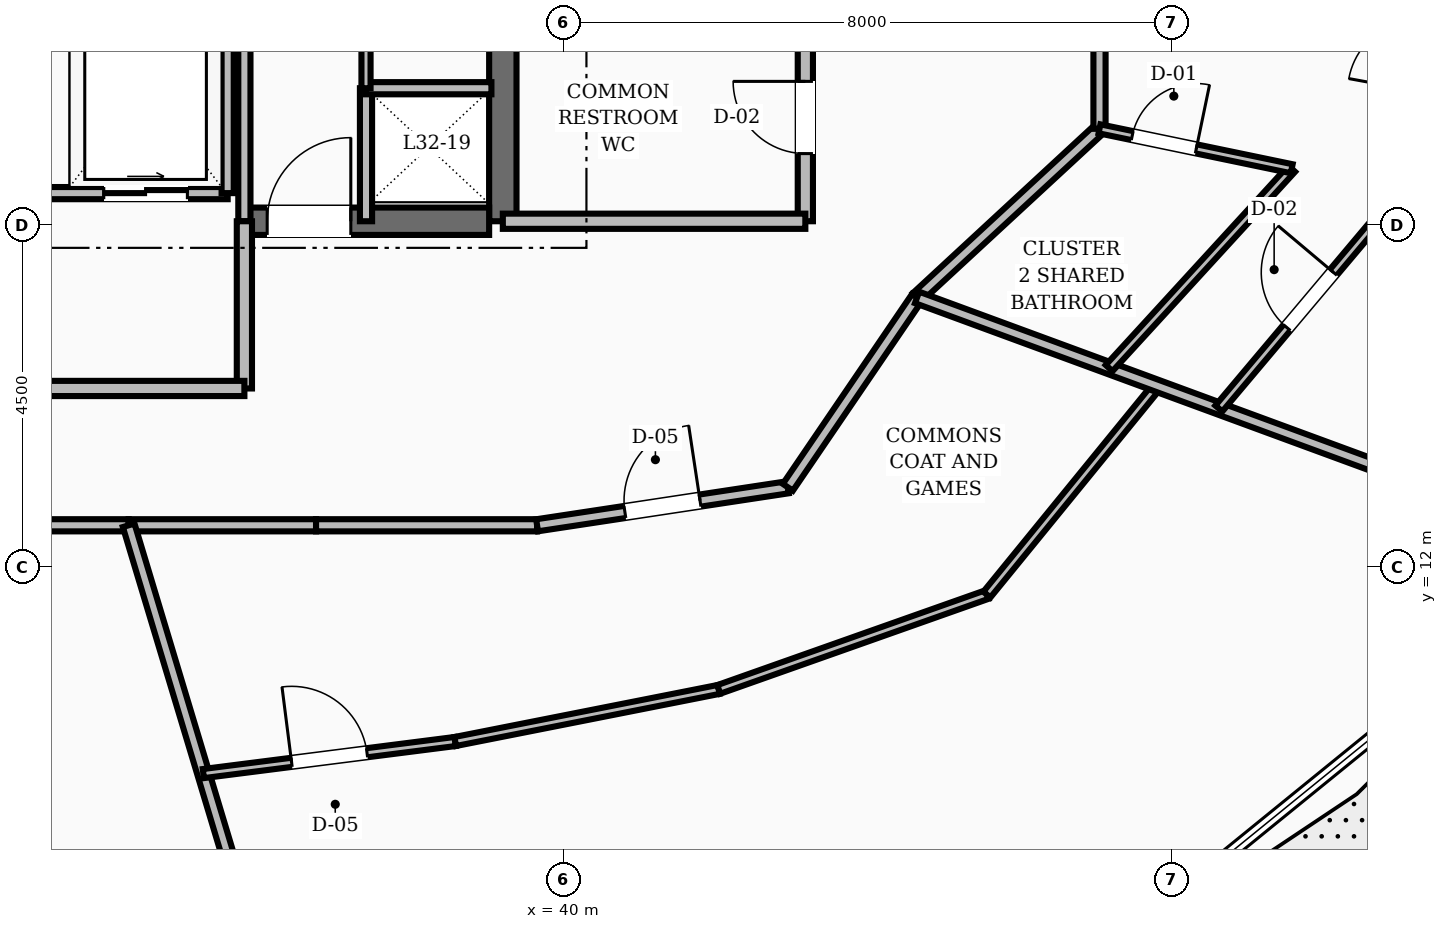
"""IFC4 building model, lengths in metres.
Left out: names, types, materials, properties, quantities, classifications, styles, units other than length and angle.
Written with IfcOpenShell. Run it as: python <this file> out.ifc"""

import sys

from ifc_helpers import new_model, si_unit, direction, frame, frame_2d, origin, place, context, subcontext, project, spatial, rectangle, extrude, element, fill, save


model = new_model("IFC4")
c1 = context("Model", 3, precision=1e-05, world=origin(), true_north=direction((0.0, 1.0)))
c2 = subcontext(c1, "Body", "Model", "MODEL_VIEW")
j1 = project(units=[si_unit("LENGTHUNIT", "METRE"), si_unit("PLANEANGLEUNIT", "RADIAN")], contexts=[c1])
p1 = place(None, origin())
s1 = spatial("IfcSite", under=j1, at=p1, CompositionType="ELEMENT")
p2 = place(p1, origin())
s2 = spatial("IfcBuilding", under=s1, at=p2, CompositionType="ELEMENT")
p3 = place(p2, frame((0.0, 0.0, 128.0)))
s3 = spatial("IfcBuildingStorey", under=s2, at=p3, CompositionType="ELEMENT", Elevation=128.0)
p4 = place(p3, frame((39.2, 16.55, 0.0), z_axis=(0.0, 0.0, 1.0), x_axis=(0.0, 1.0, 0.0)))
e1 = element("IfcWall", 1, at=p4, inside=s3, PredefinedType="SHEAR", context=c2, shape_type="SweptSolid", body=[
    extrude(rectangle(XDim=6.3, YDim=0.36, at=frame_2d((3.15, 0.0))), origin(), (0.0, 0.0, 1.0), 3.6),
])
p5 = place(p3, frame((35.8, 16.55, 0.0), z_axis=(0.0, 0.0, 1.0), x_axis=(1.0, 0.0, 0.0)))
e2 = element("IfcWall", 2, at=p5, inside=s3, PredefinedType="SHEAR", context=c2, shape_type="SweptSolid", body=[
    extrude(rectangle(XDim=3.22, YDim=0.36, at=frame_2d((1.61, 0.0))), origin(), (0.0, 0.0, 1.0), 3.6),
])
p6 = place(p5, frame((0.3, 0.0, 0.0)))
e3 = element("IfcOpeningElement", 3, at=p6, cuts=e2, PredefinedType="OPENING", context=c2, shape_type="SweptSolid", body=[
    extrude(rectangle(XDim=1.1, YDim=2.1, at=frame_2d((0.55, 1.05))), frame((0.0, 0.19, 0.0), z_axis=(0.0, -1.0, 0.0), x_axis=(1.0, 0.0, 0.0)), (0.0, 0.0, 1.0), 0.38),
])
p7 = place(p3, frame((43.18, 16.55, 0.0), z_axis=(0.0, 0.0, 1.0), x_axis=(0.0, 1.0, 0.0)))
e4 = element("IfcWall", 4, at=p7, inside=s3, PredefinedType="SOLIDWALL", context=c2, shape_type="SweptSolid", body=[
    extrude(rectangle(XDim=2.73, YDim=0.2, at=frame_2d((1.365, 0.0))), origin(), (0.0, 0.0, 1.0), 2.8),
])
p8 = place(p7, frame((0.89, 0.0, 0.0)))
e5 = element("IfcOpeningElement", 5, at=p8, cuts=e4, PredefinedType="OPENING", context=c2, shape_type="SweptSolid", body=[
    extrude(rectangle(XDim=0.95, YDim=2.1, at=frame_2d((0.475, 1.05))), frame((0.0, 0.11, 0.0), z_axis=(0.0, -1.0, 0.0), x_axis=(1.0, 0.0, 0.0)), (0.0, 0.0, 1.0), 0.22),
])
p9 = place(p3, frame((39.2, 16.55, 0.0), z_axis=(0.0, 0.0, 1.0), x_axis=(1.0, 0.0, 0.0)))
e6 = element("IfcWall", 6, at=p9, inside=s3, PredefinedType="SOLIDWALL", context=c2, shape_type="SweptSolid", body=[
    extrude(rectangle(XDim=3.98, YDim=0.2, at=frame_2d((1.99, 0.0))), origin(), (0.0, 0.0, 1.0), 2.8),
])
p10 = place(p3, frame((35.8, 16.55, 0.0), z_axis=(0.0, 0.0, 1.0), x_axis=(0.0, 1.0, 0.0)))
e7 = element("IfcWall", 7, at=p10, inside=s3, PredefinedType="SOLIDWALL", context=c2, shape_type="SweptSolid", body=[
    extrude(rectangle(XDim=3.3, YDim=0.16, at=frame_2d((1.65, 0.0))), origin(), (0.0, 0.0, 1.0), 2.8),
])
p11 = place(p3, frame((37.4, 16.55, 0.0), z_axis=(0.0, 0.0, 1.0), x_axis=(0.0, 1.0, 0.0)))
e8 = element("IfcWall", 8, at=p11, inside=s3, PredefinedType="SOLIDWALL", context=c2, shape_type="SweptSolid", body=[
    extrude(rectangle(XDim=1.75, YDim=0.16, at=frame_2d((0.875, 0.0))), origin(), (0.0, 0.0, 1.0), 2.8),
])
p12 = place(p3, frame((35.8, 14.35, 0.0), z_axis=(0.0, 0.0, 1.0), x_axis=(0.0, 1.0, 0.0)))
e9 = element("IfcWall", 9, at=p12, inside=s3, PredefinedType="SOLIDWALL", context=c2, shape_type="SweptSolid", body=[
    extrude(rectangle(XDim=2.2, YDim=0.2, at=frame_2d((1.1, 0.0))), origin(), (0.0, 0.0, 1.0), 2.8),
])
p13 = place(p3, frame((28.2, 14.35, 0.0), z_axis=(0.0, 0.0, 1.0), x_axis=(1.0, 0.0, 0.0)))
e10 = element("IfcWall", 10, at=p13, inside=s3, PredefinedType="SOLIDWALL", context=c2, shape_type="SweptSolid", body=[
    extrude(rectangle(XDim=7.6, YDim=0.2, at=frame_2d((3.8, 0.0))), origin(), (0.0, 0.0, 1.0), 2.8),
])
p14 = place(p13, frame((3.2, 0.0, 0.0)))
e11 = element("IfcOpeningElement", 11, at=p14, cuts=e10, PredefinedType="OPENING", context=c2, shape_type="SweptSolid", body=[
    extrude(rectangle(XDim=1.2, YDim=2.1, at=frame_2d((0.6, 1.05))), frame((0.0, 0.11, 0.0), z_axis=(0.0, -1.0, 0.0), x_axis=(1.0, 0.0, 0.0)), (0.0, 0.0, 1.0), 0.22),
])
p15 = place(p3, frame((28.42, 16.92, 0.0), z_axis=(0.0, 0.0, 1.0), x_axis=(1.0, 0.0, 0.0)))
e12 = element("IfcWall", 12, at=p15, inside=s3, PredefinedType="SOLIDWALL", context=c2, shape_type="SweptSolid", body=[
    extrude(rectangle(XDim=7.16, YDim=0.16, at=frame_2d((3.58, 0.0))), origin(), (0.0, 0.0, 1.0), 2.8),
])
p16 = place(p15, frame((0.53, 0.0, 0.0)))
e13 = element("IfcOpeningElement", 13, at=p16, cuts=e12, PredefinedType="OPENING", context=c2, shape_type="SweptSolid", body=[
    extrude(rectangle(XDim=1.1, YDim=2.15, at=frame_2d((0.55, 1.075))), frame((0.0, 0.09, 0.0), z_axis=(0.0, -1.0, 0.0), x_axis=(1.0, 0.0, 0.0)), (0.0, 0.0, 1.0), 0.18),
])
p17 = place(p15, frame((3.03, 0.0, 0.0)))
e14 = element("IfcOpeningElement", 14, at=p17, cuts=e12, PredefinedType="OPENING", context=c2, shape_type="SweptSolid", body=[
    extrude(rectangle(XDim=1.1, YDim=2.15, at=frame_2d((0.55, 1.075))), frame((0.0, 0.09, 0.0), z_axis=(0.0, -1.0, 0.0), x_axis=(1.0, 0.0, 0.0)), (0.0, 0.0, 1.0), 0.18),
])
p18 = place(p15, frame((5.53, 0.0, 0.0)))
e15 = element("IfcOpeningElement", 15, at=p18, cuts=e12, PredefinedType="OPENING", context=c2, shape_type="SweptSolid", body=[
    extrude(rectangle(XDim=1.1, YDim=2.15, at=frame_2d((0.55, 1.075))), frame((0.0, 0.09, 0.0), z_axis=(0.0, -1.0, 0.0), x_axis=(1.0, 0.0, 0.0)), (0.0, 0.0, 1.0), 0.18),
])
p19 = place(p3, frame((35.58, 16.92, 0.0), z_axis=(0.0, 0.0, 1.0), x_axis=(0.0, 1.0, 0.0)))
e16 = element("IfcWall", 16, at=p19, inside=s3, PredefinedType="SOLIDWALL", context=c2, shape_type="SweptSolid", body=[
    extrude(rectangle(XDim=2.76, YDim=0.16, at=frame_2d((1.38, 0.0))), origin(), (0.0, 0.0, 1.0), 2.8),
])
p20 = place(p3, frame((37.4, 18.3, 0.0), z_axis=(0.0, 0.0, 1.0), x_axis=(1.0, 0.0, 0.0)))
e17 = element("IfcWall", 17, at=p20, inside=s3, PredefinedType="SOLIDWALL", context=c2, shape_type="SweptSolid", body=[
    extrude(rectangle(XDim=1.65, YDim=0.16, at=frame_2d((0.825, 0.0))), origin(), (0.0, 0.0, 1.0), 2.8),
])
p21 = place(p3, frame((37.4, 18.3, 0.0), z_axis=(0.0, 0.0, 1.0), x_axis=(0.0, 1.0, 0.0)))
e18 = element("IfcWall", 18, at=p21, inside=s3, PredefinedType="PARTITIONING", context=c2, shape_type="SweptSolid", body=[
    extrude(rectangle(XDim=4.45, YDim=0.12, at=frame_2d((2.225, 0.0))), origin(), (0.0, 0.0, 1.0), 2.8),
])
p22 = place(p21, frame((1.75, 0.0, 0.0)))
e19 = element("IfcOpeningElement", 19, at=p22, cuts=e18, PredefinedType="OPENING", context=c2, shape_type="SweptSolid", body=[
    extrude(rectangle(XDim=0.95, YDim=2.1, at=frame_2d((0.475, 1.05))), frame((0.0, 0.07, 0.0), z_axis=(0.0, -1.0, 0.0), x_axis=(1.0, 0.0, 0.0)), (0.0, 0.0, 1.0), 0.14),
])
p23 = place(p3, frame((32.0, 12.55, 0.0), z_axis=(0.0, 0.0, 1.0), x_axis=(1.0, 0.0, 0.0)))
e20 = element("IfcWall", 20, at=p23, inside=s3, PredefinedType="SOLIDWALL", context=c2, shape_type="SweptSolid", body=[
    extrude(rectangle(XDim=2.278, YDim=0.16, at=frame_2d((1.139, 0.0))), origin(), (0.0, 0.0, 1.0), 2.8),
])
p24 = place(p3, frame((34.278, 12.55, 0.0), z_axis=(0.0, 0.0, 1.0), x_axis=(1.0, 0.0, 0.0)))
e21 = element("IfcWall", 21, at=p24, inside=s3, PredefinedType="SOLIDWALL", context=c2, shape_type="SweptSolid", body=[
    extrude(rectangle(XDim=2.465, YDim=0.16, at=frame_2d((1.232, 0.0))), origin(), (0.0, 0.0, 1.0), 2.8),
])
p25 = place(p3, frame((36.743, 12.55, 0.0), z_axis=(0.0, 0.0, 1.0), x_axis=(1.0, 0.0, 0.0)))
e22 = element("IfcWall", 22, at=p25, inside=s3, PredefinedType="SOLIDWALL", context=c2, shape_type="SweptSolid", body=[
    extrude(rectangle(XDim=2.908, YDim=0.16, at=frame_2d((1.454, 0.0))), origin(), (0.0, 0.0, 1.0), 2.8),
])
p26 = place(p3, frame((39.651, 12.55, 0.0), z_axis=(0.0, 0.0, 1.0), x_axis=(0.988710906508, 0.149835721217, 0.0)))
e23 = element("IfcWall", 23, at=p26, inside=s3, PredefinedType="SOLIDWALL", context=c2, shape_type="SweptSolid", body=[
    extrude(rectangle(XDim=3.337, YDim=0.16, at=frame_2d((1.668, 0.0))), origin(), (0.0, 0.0, 1.0), 2.8),
])
p27 = place(p26, frame((1.168, 0.0, 0.0)))
e24 = element("IfcOpeningElement", 24, at=p27, cuts=e23, PredefinedType="OPENING", context=c2, shape_type="SweptSolid", body=[
    extrude(rectangle(XDim=1.0, YDim=2.1, at=frame_2d((0.5, 1.05))), frame((0.0, 0.09, 0.0), z_axis=(0.0, -1.0, 0.0), x_axis=(1.0, 0.0, 0.0)), (0.0, 0.0, 1.0), 0.18),
])
p28 = place(p3, frame((42.95, 13.05, 0.0), z_axis=(0.0, 0.0, 1.0), x_axis=(0.562674669208, 0.826678423955, 0.0)))
e25 = element("IfcWall", 25, at=p28, inside=s3, PredefinedType="SOLIDWALL", context=c2, shape_type="SweptSolid", body=[
    extrude(rectangle(XDim=3.021, YDim=0.16, at=frame_2d((1.511, 0.0))), origin(), (0.0, 0.0, 1.0), 2.8),
])
p29 = place(p3, frame((44.65, 15.548, 0.0), z_axis=(0.0, 0.0, 1.0), x_axis=(0.734347936521, 0.678773237633, 0.0)))
e26 = element("IfcWall", 26, at=p29, inside=s3, PredefinedType="SOLIDWALL", context=c2, shape_type="SweptSolid", body=[
    extrude(rectangle(XDim=3.268, YDim=0.16, at=frame_2d((1.634, 0.0))), origin(), (0.0, 0.0, 1.0), 2.8),
])
p30 = place(p3, frame((47.05, 17.766, 0.0), z_axis=(0.0, 0.0, 1.0), x_axis=(0.0, 1.0, 0.0)))
e27 = element("IfcWall", 27, at=p30, inside=s3, PredefinedType="SOLIDWALL", context=c2, shape_type="SweptSolid", body=[
    extrude(rectangle(XDim=3.24, YDim=0.16, at=frame_2d((1.62, 0.0))), origin(), (0.0, 0.0, 1.0), 2.8),
])
p31 = place(p30, frame((1.12, 0.0, 0.0)))
e28 = element("IfcOpeningElement", 28, at=p31, cuts=e27, PredefinedType="OPENING", context=c2, shape_type="SweptSolid", body=[
    extrude(rectangle(XDim=1.0, YDim=2.1, at=frame_2d((0.5, 1.05))), frame((0.0, 0.09, 0.0), z_axis=(0.0, -1.0, 0.0), x_axis=(1.0, 0.0, 0.0)), (0.0, 0.0, 1.0), 0.18),
])
p32 = place(p3, frame((34.278, 12.55, 0.0), z_axis=(0.0, 0.0, 1.0), x_axis=(0.288080089765, -0.957606318839, 0.0)))
e29 = element("IfcWall", 29, at=p32, inside=s3, PredefinedType="SOLIDWALL", context=c2, shape_type="SweptSolid", body=[
    extrude(rectangle(XDim=9.696, YDim=0.16, at=frame_2d((4.848, 0.0))), origin(), (0.0, 0.0, 1.0), 2.8),
])
p33 = place(p3, frame((35.26, 9.284, 0.0), z_axis=(0.0, 0.0, 1.0), x_axis=(0.99199308458, 0.126292201441, 0.0)))
e30 = element("IfcWall", 30, at=p33, inside=s3, PredefinedType="PARTITIONING", context=c2, shape_type="SweptSolid", body=[
    extrude(rectangle(XDim=3.341, YDim=0.12, at=frame_2d((1.67, 0.0))), origin(), (0.0, 0.0, 1.0), 2.8),
])
p34 = place(p33, frame((1.17, 0.0, 0.0)))
e31 = element("IfcOpeningElement", 31, at=p34, cuts=e30, PredefinedType="OPENING", context=c2, shape_type="SweptSolid", body=[
    extrude(rectangle(XDim=1.0, YDim=2.1, at=frame_2d((0.5, 1.05))), frame((0.0, 0.07, 0.0), z_axis=(0.0, -1.0, 0.0), x_axis=(1.0, 0.0, 0.0)), (0.0, 0.0, 1.0), 0.14),
])
p35 = place(p3, frame((38.574, 9.706, 0.0), z_axis=(0.0, 0.0, 1.0), x_axis=(0.981021848775, 0.19389722078, 0.0)))
e32 = element("IfcWall", 32, at=p35, inside=s3, PredefinedType="PARTITIONING", context=c2, shape_type="SweptSolid", body=[
    extrude(rectangle(XDim=3.534, YDim=0.12, at=frame_2d((1.767, 0.0))), origin(), (0.0, 0.0, 1.0), 2.8),
])
p36 = place(p3, frame((42.041, 10.391, 0.0), z_axis=(0.0, 0.0, 1.0), x_axis=(0.942784138044, 0.333403762806, 0.0)))
e33 = element("IfcWall", 33, at=p36, inside=s3, PredefinedType="PARTITIONING", context=c2, shape_type="SweptSolid", body=[
    extrude(rectangle(XDim=3.741, YDim=0.12, at=frame_2d((1.871, 0.0))), origin(), (0.0, 0.0, 1.0), 2.8),
])
p37 = place(p3, frame((45.568, 11.638, 0.0), z_axis=(0.0, 0.0, 1.0), x_axis=(0.631833921948, 0.775103796324, 0.0)))
e34 = element("IfcWall", 34, at=p37, inside=s3, PredefinedType="PARTITIONING", context=c2, shape_type="SweptSolid", body=[
    extrude(rectangle(XDim=3.544, YDim=0.12, at=frame_2d((1.772, 0.0))), origin(), (0.0, 0.0, 1.0), 2.8),
])
p38 = place(p3, frame((44.65, 15.548, 0.0), z_axis=(0.0, 0.0, 1.0), x_axis=(0.938483808639, -0.345323241215, 0.0)))
e35 = element("IfcWall", 35, at=p38, inside=s3, PredefinedType="SOLIDWALL", context=c2, shape_type="SweptSolid", body=[
    extrude(rectangle(XDim=9.564, YDim=0.16, at=frame_2d((4.782, 0.0))), origin(), (0.0, 0.0, 1.0), 2.8),
])
p39 = place(p3, frame((47.177, 14.618, 0.0), z_axis=(0.0, 0.0, 1.0), x_axis=(0.675367129761, 0.737481687935, 0.0)))
e36 = element("IfcWall", 36, at=p39, inside=s3, PredefinedType="PARTITIONING", context=c2, shape_type="SweptSolid", body=[
    extrude(rectangle(XDim=3.557, YDim=0.12, at=frame_2d((1.779, 0.0))), origin(), (0.0, 0.0, 1.0), 2.8),
])
p40 = place(p3, frame((47.05, 17.766, 0.0), z_axis=(0.0, 0.0, 1.0), x_axis=(0.979129578615, -0.203236975673, 0.0)))
e37 = element("IfcWall", 37, at=p40, inside=s3, PredefinedType="PARTITIONING", context=c2, shape_type="SweptSolid", body=[
    extrude(rectangle(XDim=2.583, YDim=0.12, at=frame_2d((1.292, 0.0))), origin(), (0.0, 0.0, 1.0), 2.8),
])
p41 = place(p40, frame((0.44, 0.0, 0.0)))
e38 = element("IfcOpeningElement", 38, at=p41, cuts=e37, PredefinedType="OPENING", context=c2, shape_type="SweptSolid", body=[
    extrude(rectangle(XDim=0.86, YDim=2.1, at=frame_2d((0.43, 1.05))), frame((0.0, 0.07, 0.0), z_axis=(0.0, -1.0, 0.0), x_axis=(1.0, 0.0, 0.0)), (0.0, 0.0, 1.0), 0.14),
])
p42 = place(p3, frame((48.62, 14.087, 0.0), z_axis=(0.0, 0.0, 1.0), x_axis=(0.644101495502, 0.764940039148, 0.0)))
e39 = element("IfcWall", 39, at=p42, inside=s3, PredefinedType="PARTITIONING", context=c2, shape_type="SweptSolid", body=[
    extrude(rectangle(XDim=3.732, YDim=0.12, at=frame_2d((1.866, 0.0))), origin(), (0.0, 0.0, 1.0), 2.8),
])
p43 = place(p42, frame((1.391, 0.0, 0.0)))
e40 = element("IfcOpeningElement", 40, at=p43, cuts=e39, PredefinedType="OPENING", context=c2, shape_type="SweptSolid", body=[
    extrude(rectangle(XDim=0.95, YDim=2.1, at=frame_2d((0.475, 1.05))), frame((0.0, 0.07, 0.0), z_axis=(0.0, -1.0, 0.0), x_axis=(1.0, 0.0, 0.0)), (0.0, 0.0, 1.0), 0.14),
])
p44 = place(p8, origin())
e41 = element("IfcDoor", 41, at=p44, inside=s3, OperationType="SINGLE_SWING_RIGHT", PredefinedType="DOOR", context=c2, shape_type="SweptSolid", body=[
    extrude(rectangle(XDim=0.95, YDim=2.1, at=frame_2d((0.475, 1.05))), frame((0.0, 0.025, 0.0), z_axis=(0.0, -1.0, 0.0), x_axis=(1.0, 0.0, 0.0)), (0.0, 0.0, 1.0), 0.05),
])
fill(e5, e41)
p45 = place(p6, origin())
e42 = element("IfcDoor", 42, at=p45, inside=s3, OperationType="SINGLE_SWING_RIGHT", PredefinedType="DOOR", context=c2, shape_type="SweptSolid", body=[
    extrude(rectangle(XDim=1.1, YDim=2.1, at=frame_2d((0.55, 1.05))), frame((0.0, 0.025, 0.0), z_axis=(0.0, -1.0, 0.0), x_axis=(1.0, 0.0, 0.0)), (0.0, 0.0, 1.0), 0.05),
])
fill(e3, e42)
p46 = place(p18, origin())
e43 = element("IfcDoor", 43, at=p46, inside=s3, OperationType="SLIDING_TO_RIGHT", PredefinedType="DOOR", context=c2, shape_type="SweptSolid", body=[
    extrude(rectangle(XDim=1.1, YDim=2.15, at=frame_2d((0.55, 1.075))), frame((0.0, 0.025, 0.0), z_axis=(0.0, -1.0, 0.0), x_axis=(1.0, 0.0, 0.0)), (0.0, 0.0, 1.0), 0.05),
])
fill(e15, e43)
p47 = place(p27, origin())
e44 = element("IfcDoor", 44, at=p47, inside=s3, OperationType="SINGLE_SWING_RIGHT", PredefinedType="DOOR", context=c2, shape_type="SweptSolid", body=[
    extrude(rectangle(XDim=1.0, YDim=2.1, at=frame_2d((0.5, 1.05))), frame((0.0, 0.025, 0.0), z_axis=(0.0, -1.0, 0.0), x_axis=(1.0, 0.0, 0.0)), (0.0, 0.0, 1.0), 0.05),
])
fill(e24, e44)
p48 = place(p34, origin())
e45 = element("IfcDoor", 45, at=p48, inside=s3, OperationType="SINGLE_SWING_LEFT", PredefinedType="DOOR", context=c2, shape_type="SweptSolid", body=[
    extrude(rectangle(XDim=1.0, YDim=2.1, at=frame_2d((0.5, 1.05))), frame((0.0, 0.025, 0.0), z_axis=(0.0, -1.0, 0.0), x_axis=(1.0, 0.0, 0.0)), (0.0, 0.0, 1.0), 0.05),
])
fill(e31, e45)
p49 = place(p41, origin())
e46 = element("IfcDoor", 46, at=p49, inside=s3, OperationType="SINGLE_SWING_RIGHT", PredefinedType="DOOR", context=c2, shape_type="SweptSolid", body=[
    extrude(rectangle(XDim=0.86, YDim=2.1, at=frame_2d((0.43, 1.05))), frame((0.0, 0.025, 0.0), z_axis=(0.0, -1.0, 0.0), x_axis=(1.0, 0.0, 0.0)), (0.0, 0.0, 1.0), 0.05),
])
fill(e38, e46)
p50 = place(p43, origin())
e47 = element("IfcDoor", 47, at=p50, inside=s3, OperationType="SINGLE_SWING_RIGHT", PredefinedType="DOOR", context=c2, shape_type="SweptSolid", body=[
    extrude(rectangle(XDim=0.95, YDim=2.1, at=frame_2d((0.475, 1.05))), frame((0.0, 0.025, 0.0), z_axis=(0.0, -1.0, 0.0), x_axis=(1.0, 0.0, 0.0)), (0.0, 0.0, 1.0), 0.05),
])
fill(e40, e47)
save(model, sys.argv[1])
